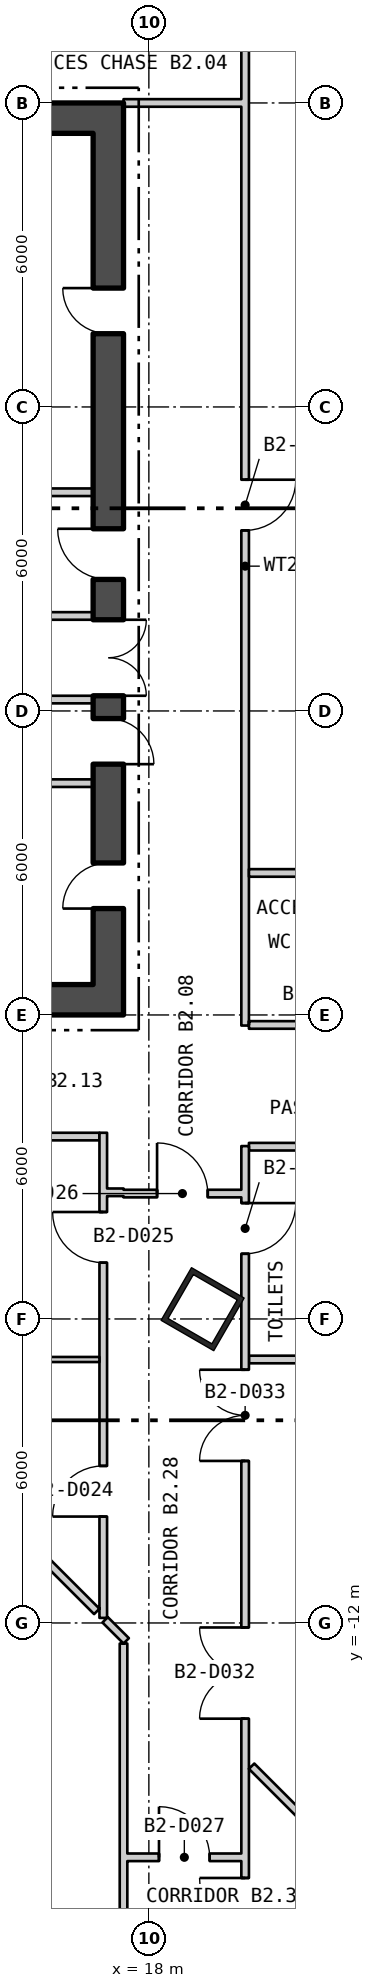
"""IFC4 building model, lengths in metres.
Left out: names, types, materials, properties, quantities, classifications, styles, units other than length and angle.
Written with IfcOpenShell. Run it as: python <this file> out.ifc"""

import sys

from ifc_helpers import new_model, si_unit, direction, frame, frame_2d, origin, origin_2d, place, context, subcontext, project, spatial, rectangle, hollow_rectangle, extrude, element, fill, save


model = new_model("IFC4")
c1 = context("Model", 3, precision=1e-05, world=origin(), true_north=direction((0.0, 1.0)))
c2 = subcontext(c1, "Body", "Model", "MODEL_VIEW")
j1 = project(units=[si_unit("LENGTHUNIT", "METRE"), si_unit("PLANEANGLEUNIT", "RADIAN")], contexts=[c1])
p1 = place(None, origin())
s1 = spatial("IfcSite", under=j1, at=p1, CompositionType="ELEMENT")
p2 = place(p1, origin())
s2 = spatial("IfcBuilding", under=s1, at=p2, CompositionType="ELEMENT")
p3 = place(p2, frame((0.0, 0.0, -11.4)))
s3 = spatial("IfcBuildingStorey", under=s2, at=p3, CompositionType="ELEMENT", Elevation=-11.4)
p4 = place(p3, frame((19.061, -5.807, 0.0), z_axis=(0.0, 0.0, 1.0), x_axis=(0.5, 0.866025403784, 0.0)))
e1 = element("IfcColumn", 1, at=p4, inside=s3, PredefinedType="COLUMN", context=c2, shape_type="SweptSolid", body=[
    extrude(hollow_rectangle(XDim=1.2, YDim=1.2, WallThickness=0.1, at=origin_2d()), origin(), (0.0, 0.0, 1.0), 5.7),
])
p5 = place(p3, frame((-17.5, 0.3, 0.0), z_axis=(0.0, 0.0, 1.0), x_axis=(1.0, 0.0, 0.0)))
e2 = element("IfcWall", 2, at=p5, inside=s3, PredefinedType="SHEAR", context=c2, shape_type="SweptSolid", body=[
    extrude(rectangle(XDim=35.0, YDim=0.6, at=frame_2d((17.5, 0.0))), origin(), (0.0, 0.0, 1.0), 5.25),
])
p6 = place(p5, frame((12.0, 0.0, 0.0)))
e3 = element("IfcOpeningElement", 3, at=p6, cuts=e2, PredefinedType="OPENING", context=c2, shape_type="SweptSolid", body=[
    extrude(rectangle(XDim=1.8, YDim=2.4, at=frame_2d((0.9, 1.2))), frame((0.0, 0.31, 0.0), z_axis=(0.0, -1.0, 0.0), x_axis=(1.0, 0.0, 0.0)), (0.0, 0.0, 1.0), 0.62),
])
p7 = place(p5, frame((22.0, 0.0, 0.0)))
e4 = element("IfcOpeningElement", 4, at=p7, cuts=e2, PredefinedType="OPENING", context=c2, shape_type="SweptSolid", body=[
    extrude(rectangle(XDim=1.8, YDim=2.4, at=frame_2d((0.9, 1.2))), frame((0.0, 0.31, 0.0), z_axis=(0.0, -1.0, 0.0), x_axis=(1.0, 0.0, 0.0)), (0.0, 0.0, 1.0), 0.62),
])
p8 = place(p3, frame((-17.5, 17.7, 0.0), z_axis=(0.0, 0.0, 1.0), x_axis=(1.0, 0.0, 0.0)))
e5 = element("IfcWall", 5, at=p8, inside=s3, PredefinedType="SHEAR", context=c2, shape_type="SweptSolid", body=[
    extrude(rectangle(XDim=35.0, YDim=0.6, at=frame_2d((17.5, 0.0))), origin(), (0.0, 0.0, 1.0), 5.25),
])
p9 = place(p3, frame((17.2, 0.6, 0.0), z_axis=(0.0, 0.0, 1.0), x_axis=(0.0, 1.0, 0.0)))
e6 = element("IfcWall", 6, at=p9, inside=s3, PredefinedType="SHEAR", context=c2, shape_type="SweptSolid", body=[
    extrude(rectangle(XDim=16.8, YDim=0.6, at=frame_2d((8.4, 0.0))), origin(), (0.0, 0.0, 1.0), 5.25),
])
p10 = place(p9, frame((5.7, 0.0, 0.0)))
e7 = element("IfcOpeningElement", 7, at=p10, cuts=e6, PredefinedType="OPENING", context=c2, shape_type="SweptSolid", body=[
    extrude(rectangle(XDim=1.5, YDim=2.1, at=frame_2d((0.75, 1.05))), frame((0.0, 0.31, 0.0), z_axis=(0.0, -1.0, 0.0), x_axis=(1.0, 0.0, 0.0)), (0.0, 0.0, 1.0), 0.62),
])
p11 = place(p9, frame((1.5, 0.0, 0.0)))
e8 = element("IfcOpeningElement", 8, at=p11, cuts=e6, PredefinedType="OPENING", context=c2, shape_type="SweptSolid", body=[
    extrude(rectangle(XDim=0.9, YDim=2.1, at=frame_2d((0.45, 1.05))), frame((0.0, 0.31, 0.0), z_axis=(0.0, -1.0, 0.0), x_axis=(1.0, 0.0, 0.0)), (0.0, 0.0, 1.0), 0.62),
])
p12 = place(p9, frame((4.35, 0.0, 0.0)))
e9 = element("IfcOpeningElement", 9, at=p12, cuts=e6, PredefinedType="OPENING", context=c2, shape_type="SweptSolid", body=[
    extrude(rectangle(XDim=0.9, YDim=2.1, at=frame_2d((0.45, 1.05))), frame((0.0, 0.31, 0.0), z_axis=(0.0, -1.0, 0.0), x_axis=(1.0, 0.0, 0.0)), (0.0, 0.0, 1.0), 0.62),
])
p13 = place(p9, frame((7.996, 0.0, 0.0)))
e10 = element("IfcOpeningElement", 10, at=p13, cuts=e6, PredefinedType="OPENING", context=c2, shape_type="SweptSolid", body=[
    extrude(rectangle(XDim=1.0, YDim=2.1, at=frame_2d((0.5, 1.05))), frame((0.0, 0.31, 0.0), z_axis=(0.0, -1.0, 0.0), x_axis=(1.0, 0.0, 0.0)), (0.0, 0.0, 1.0), 0.62),
])
p14 = place(p9, frame((12.846, 0.0, 0.0)))
e11 = element("IfcOpeningElement", 11, at=p14, cuts=e6, PredefinedType="OPENING", context=c2, shape_type="SweptSolid", body=[
    extrude(rectangle(XDim=0.9, YDim=2.1, at=frame_2d((0.45, 1.05))), frame((0.0, 0.31, 0.0), z_axis=(0.0, -1.0, 0.0), x_axis=(1.0, 0.0, 0.0)), (0.0, 0.0, 1.0), 0.62),
])
for number, where, z_axis, x_axis in (
    (12, (14.5, 6.225, 0.0), (0.0, 0.0, 1.0), (1.0, 0.0, 0.0)),
    (13, (14.5, 7.875, 0.0), (0.0, 0.0, 1.0), (1.0, 0.0, 0.0)),
    (14, (14.5, 4.575, 0.0), (0.0, 0.0, 1.0), (1.0, 0.0, 0.0)),
    (15, (14.5, 10.317, 0.0), (0.0, 0.0, 1.0), (1.0, 0.0, 0.0)),
):
    element("IfcWall", number, at=place(p3, frame(where, z_axis=z_axis, x_axis=x_axis)), inside=s3, PredefinedType="PARTITIONING", context=c2, shape_type="SweptSolid", body=[
        extrude(rectangle(XDim=2.4, YDim=0.15, at=frame_2d((1.2, 0.0))), origin(), (0.0, 0.0, 1.0), 5.25),
    ])
p15 = place(p3, frame((11.575, -2.4, 0.0), z_axis=(0.0, 0.0, 1.0), x_axis=(1.0, 0.0, 0.0)))
e16 = element("IfcWall", 16, at=p15, inside=s3, PredefinedType="PARTITIONING", context=c2, shape_type="SweptSolid", body=[
    extrude(rectangle(XDim=5.45, YDim=0.15, at=frame_2d((2.725, 0.0))), origin(), (0.0, 0.0, 1.0), 5.25),
])
p16 = place(p3, frame((11.947, -6.747, 0.0), z_axis=(0.0, 0.0, 1.0), x_axis=(0.707106781187, -0.707106781187, 0.0)))
e17 = element("IfcWall", 17, at=p16, inside=s3, PredefinedType="PARTITIONING", context=c2, shape_type="SweptSolid", body=[
    extrude(rectangle(XDim=7.106, YDim=0.15, at=frame_2d((3.553, 0.0))), origin(), (0.0, 0.0, 1.0), 5.25),
])
p17 = place(p3, frame((12.157, -6.8, 0.0), z_axis=(0.0, 0.0, 1.0), x_axis=(1.0, 0.0, 0.0)))
e18 = element("IfcWall", 18, at=p17, inside=s3, PredefinedType="PARTITIONING", context=c2, shape_type="SweptSolid", body=[
    extrude(rectangle(XDim=4.868, YDim=0.1, at=frame_2d((2.434, 0.0))), origin(), (0.0, 0.0, 1.0), 5.25),
])
p18 = place(p3, frame((17.1, -11.9, 0.0), z_axis=(0.0, 0.0, 1.0), x_axis=(0.0, 1.0, 0.0)))
e19 = element("IfcWall", 19, at=p18, inside=s3, PredefinedType="PARTITIONING", context=c2, shape_type="SweptSolid", body=[
    extrude(rectangle(XDim=9.575, YDim=0.15, at=frame_2d((4.787, 0.0))), origin(), (0.0, 0.0, 1.0), 5.25),
])
p19 = place(p18, frame((2.0, 0.0, 0.0)))
e20 = element("IfcOpeningElement", 20, at=p19, cuts=e19, PredefinedType="OPENING", context=c2, shape_type="SweptSolid", body=[
    extrude(rectangle(XDim=1.0, YDim=2.1, at=frame_2d((0.5, 1.05))), frame((0.0, 0.085, 0.0), z_axis=(0.0, -1.0, 0.0), x_axis=(1.0, 0.0, 0.0)), (0.0, 0.0, 1.0), 0.17),
])
p20 = place(p18, frame((7.011, 0.0, 0.0)))
e21 = element("IfcOpeningElement", 21, at=p20, cuts=e19, PredefinedType="OPENING", context=c2, shape_type="SweptSolid", body=[
    extrude(rectangle(XDim=1.0, YDim=2.1, at=frame_2d((0.5, 1.05))), frame((0.0, 0.085, 0.0), z_axis=(0.0, -1.0, 0.0), x_axis=(1.0, 0.0, 0.0)), (0.0, 0.0, 1.0), 0.17),
])
p21 = place(p3, frame((17.137, -11.938, 0.0), z_axis=(0.0, 0.0, 1.0), x_axis=(0.707957179278, -0.706255359136, 0.0)))
e22 = element("IfcWall", 22, at=p21, inside=s3, PredefinedType="PARTITIONING", context=c2, shape_type="SweptSolid", body=[
    extrude(rectangle(XDim=0.588, YDim=0.15, at=frame_2d((0.294, 0.0))), origin(), (0.0, 0.0, 1.0), 5.25),
])
p22 = place(p3, frame((17.175, -3.5, 0.0), z_axis=(0.0, 0.0, 1.0), x_axis=(1.0, 0.0, 0.0)))
e23 = element("IfcWall", 23, at=p22, inside=s3, PredefinedType="PARTITIONING", context=c2, shape_type="SweptSolid", body=[
    extrude(rectangle(XDim=0.325, YDim=0.15, at=frame_2d((0.163, 0.0))), origin(), (0.0, 0.0, 1.0), 5.25),
])
p23 = place(p3, frame((17.5, -19.963, 0.0), z_axis=(0.0, 0.0, 1.0), x_axis=(0.0, 1.0, 0.0)))
e24 = element("IfcWall", 24, at=p23, inside=s3, PredefinedType="PARTITIONING", context=c2, shape_type="SweptSolid", body=[
    extrude(rectangle(XDim=7.557, YDim=0.15, at=frame_2d((3.779, 0.0))), origin(), (0.0, 0.0, 1.0), 5.25),
])
p24 = place(p3, frame((17.5, -3.525, 0.0), z_axis=(0.0, 0.0, 1.0), x_axis=(1.0, 0.0, 0.0)))
e25 = element("IfcWall", 25, at=p24, inside=s3, PredefinedType="PARTITIONING", context=c2, shape_type="SweptSolid", body=[
    extrude(rectangle(XDim=2.325, YDim=0.15, at=frame_2d((1.163, 0.0))), origin(), (0.0, 0.0, 1.0), 5.25),
])
p25 = place(p24, frame((0.662, 0.0, 0.0)))
e26 = element("IfcOpeningElement", 26, at=p25, cuts=e25, PredefinedType="OPENING", context=c2, shape_type="SweptSolid", body=[
    extrude(rectangle(XDim=1.0, YDim=2.1, at=frame_2d((0.5, 1.05))), frame((0.0, 0.085, 0.0), z_axis=(0.0, -1.0, 0.0), x_axis=(1.0, 0.0, 0.0)), (0.0, 0.0, 1.0), 0.17),
])
p26 = place(p3, frame((17.5, 18.0, 0.0), z_axis=(0.0, 0.0, 1.0), x_axis=(1.0, 0.0, 0.0)))
e27 = element("IfcWall", 27, at=p26, inside=s3, PredefinedType="PARTITIONING", context=c2, shape_type="SweptSolid", body=[
    extrude(rectangle(XDim=2.475, YDim=0.15, at=frame_2d((1.238, 0.0))), origin(), (0.0, 0.0, 1.0), 5.25),
])
p27 = place(p3, frame((17.575, -16.625, 0.0), z_axis=(0.0, 0.0, 1.0), x_axis=(1.0, 0.0, 0.0)))
e28 = element("IfcWall", 28, at=p27, inside=s3, PredefinedType="PARTITIONING", context=c2, shape_type="SweptSolid", body=[
    extrude(rectangle(XDim=2.25, YDim=0.15, at=frame_2d((1.125, 0.0))), origin(), (0.0, 0.0, 1.0), 5.25),
])
p28 = place(p27, frame((0.625, 0.0, 0.0)))
e29 = element("IfcOpeningElement", 29, at=p28, cuts=e28, PredefinedType="OPENING", context=c2, shape_type="SweptSolid", body=[
    extrude(rectangle(XDim=1.0, YDim=2.1, at=frame_2d((0.5, 1.05))), frame((0.0, 0.085, 0.0), z_axis=(0.0, -1.0, 0.0), x_axis=(1.0, 0.0, 0.0)), (0.0, 0.0, 1.0), 0.17),
])
p29 = place(p3, frame((19.9, -23.775, 0.0), z_axis=(0.0, 0.0, 1.0), x_axis=(0.0, 1.0, 0.0)))
e30 = element("IfcWall", 30, at=p29, inside=s3, PredefinedType="PARTITIONING", context=c2, shape_type="SweptSolid", body=[
    extrude(rectangle(XDim=21.187, YDim=0.15, at=frame_2d((10.594, 0.0))), origin(), (0.0, 0.0, 1.0), 5.25),
])
p30 = place(p29, frame((0.275, 0.0, 0.0)))
e31 = element("IfcOpeningElement", 31, at=p30, cuts=e30, PredefinedType="OPENING", context=c2, shape_type="SweptSolid", body=[
    extrude(rectangle(XDim=1.0, YDim=2.1, at=frame_2d((0.5, 1.05))), frame((0.0, 0.085, 0.0), z_axis=(0.0, -1.0, 0.0), x_axis=(1.0, 0.0, 0.0)), (0.0, 0.0, 1.0), 0.17),
])
p31 = place(p29, frame((4.942, 0.0, 0.0)))
e32 = element("IfcOpeningElement", 32, at=p31, cuts=e30, PredefinedType="OPENING", context=c2, shape_type="SweptSolid", body=[
    extrude(rectangle(XDim=1.8, YDim=2.1, at=frame_2d((0.9, 1.05))), frame((0.0, 0.085, 0.0), z_axis=(0.0, -1.0, 0.0), x_axis=(1.0, 0.0, 0.0)), (0.0, 0.0, 1.0), 0.17),
])
p32 = place(p29, frame((9.886, 0.0, 0.0)))
e33 = element("IfcOpeningElement", 33, at=p32, cuts=e30, PredefinedType="OPENING", context=c2, shape_type="SweptSolid", body=[
    extrude(rectangle(XDim=1.8, YDim=2.1, at=frame_2d((0.9, 1.05))), frame((0.0, 0.085, 0.0), z_axis=(0.0, -1.0, 0.0), x_axis=(1.0, 0.0, 0.0)), (0.0, 0.0, 1.0), 0.17),
])
p33 = place(p29, frame((14.973, 0.0, 0.0)))
e34 = element("IfcOpeningElement", 34, at=p33, cuts=e30, PredefinedType="OPENING", context=c2, shape_type="SweptSolid", body=[
    extrude(rectangle(XDim=1.8, YDim=2.1, at=frame_2d((0.9, 1.05))), frame((0.0, 0.085, 0.0), z_axis=(0.0, -1.0, 0.0), x_axis=(1.0, 0.0, 0.0)), (0.0, 0.0, 1.0), 0.17),
])
p34 = place(p29, frame((19.062, 0.0, 0.0)))
e35 = element("IfcOpeningElement", 35, at=p34, cuts=e30, PredefinedType="OPENING", context=c2, shape_type="SweptSolid", body=[
    extrude(rectangle(XDim=1.0, YDim=2.1, at=frame_2d((0.5, 1.05))), frame((0.0, 0.085, 0.0), z_axis=(0.0, -1.0, 0.0), x_axis=(1.0, 0.0, 0.0)), (0.0, 0.0, 1.0), 0.17),
])
p35 = place(p3, frame((19.9, -0.209, 0.0), z_axis=(0.0, 0.0, 1.0), x_axis=(0.0, 1.0, 0.0)))
e36 = element("IfcWall", 36, at=p35, inside=s3, PredefinedType="PARTITIONING", context=c2, shape_type="SweptSolid", body=[
    extrude(rectangle(XDim=18.134, YDim=0.15, at=frame_2d((9.067, 0.0))), origin(), (0.0, 0.0, 1.0), 5.25),
])
p36 = place(p35, frame((9.773, 0.0, 0.0)))
e37 = element("IfcOpeningElement", 37, at=p36, cuts=e36, PredefinedType="OPENING", context=c2, shape_type="SweptSolid", body=[
    extrude(rectangle(XDim=1.0, YDim=2.1, at=frame_2d((0.5, 1.05))), frame((0.0, 0.085, 0.0), z_axis=(0.0, -1.0, 0.0), x_axis=(1.0, 0.0, 0.0)), (0.0, 0.0, 1.0), 0.17),
])
p37 = place(p3, frame((19.9, 18.075, 0.0), z_axis=(0.0, 0.0, 1.0), x_axis=(0.0, 1.0, 0.0)))
e38 = element("IfcWall", 38, at=p37, inside=s3, PredefinedType="PARTITIONING", context=c2, shape_type="SweptSolid", body=[
    extrude(rectangle(XDim=1.675, YDim=0.15, at=frame_2d((0.838, 0.0))), origin(), (0.0, 0.0, 1.0), 5.25),
])
p38 = place(p3, frame((19.975, -6.8, 0.0), z_axis=(0.0, 0.0, 1.0), x_axis=(1.0, 0.0, 0.0)))
e39 = element("IfcWall", 39, at=p38, inside=s3, PredefinedType="PARTITIONING", context=c2, shape_type="SweptSolid", body=[
    extrude(rectangle(XDim=6.775, YDim=0.15, at=frame_2d((3.388, 0.0))), origin(), (0.0, 0.0, 1.0), 5.25),
])
p39 = place(p3, frame((19.975, -2.6, 0.0), z_axis=(0.0, 0.0, 1.0), x_axis=(1.0, 0.0, 0.0)))
e40 = element("IfcWall", 40, at=p39, inside=s3, PredefinedType="PARTITIONING", context=c2, shape_type="SweptSolid", body=[
    extrude(rectangle(XDim=2.282, YDim=0.15, at=frame_2d((1.141, 0.0))), origin(), (0.0, 0.0, 1.0), 5.25),
])
p40 = place(p3, frame((19.975, 2.803, 0.0), z_axis=(0.0, 0.0, 1.0), x_axis=(1.0, 0.0, 0.0)))
e41 = element("IfcWall", 41, at=p40, inside=s3, PredefinedType="PARTITIONING", context=c2, shape_type="SweptSolid", body=[
    extrude(rectangle(XDim=2.925, YDim=0.15, at=frame_2d((1.462, 0.0))), origin(), (0.0, 0.0, 1.0), 5.25),
])
p41 = place(p3, frame((19.975, -0.197, 0.0), z_axis=(0.0, 0.0, 1.0), x_axis=(0.999999901962, -0.000442804385, 0.0)))
e42 = element("IfcWall", 42, at=p41, inside=s3, PredefinedType="PARTITIONING", context=c2, shape_type="SweptSolid", body=[
    extrude(rectangle(XDim=6.775, YDim=0.15, at=frame_2d((3.388, 0.0))), origin(), (0.0, 0.0, 1.0), 5.25),
])
p42 = place(p41, frame((0.962, 0.0, 0.0)))
e43 = element("IfcOpeningElement", 43, at=p42, cuts=e42, PredefinedType="OPENING", context=c2, shape_type="SweptSolid", body=[
    extrude(rectangle(XDim=1.0, YDim=2.1, at=frame_2d((0.5, 1.05))), frame((0.0, 0.085, 0.0), z_axis=(0.0, -1.0, 0.0), x_axis=(1.0, 0.0, 0.0)), (0.0, 0.0, 1.0), 0.17),
])
p43 = place(p3, frame((20.028, -14.827, 0.0), z_axis=(0.0, 0.0, 1.0), x_axis=(0.707106781187, -0.707106781187, 0.0)))
e44 = element("IfcWall", 44, at=p43, inside=s3, PredefinedType="PARTITIONING", context=c2, shape_type="SweptSolid", body=[
    extrude(rectangle(XDim=7.068, YDim=0.15, at=frame_2d((3.534, 0.0))), origin(), (0.0, 0.0, 1.0), 5.25),
])
p44 = place(p10, origin())
e45 = element("IfcDoor", 45, at=p44, inside=s3, OperationType="DOUBLE_DOOR_SINGLE_SWING", PredefinedType="DOOR", context=c2, shape_type="SweptSolid", body=[
    extrude(rectangle(XDim=1.5, YDim=2.1, at=frame_2d((0.75, 1.05))), frame((0.0, 0.025, 0.0), z_axis=(0.0, -1.0, 0.0), x_axis=(1.0, 0.0, 0.0)), (0.0, 0.0, 1.0), 0.05),
])
fill(e7, e45)
p45 = place(p11, origin())
e46 = element("IfcDoor", 46, at=p45, inside=s3, OperationType="SINGLE_SWING_RIGHT", PredefinedType="DOOR", context=c2, shape_type="SweptSolid", body=[
    extrude(rectangle(XDim=0.9, YDim=2.1, at=frame_2d((0.45, 1.05))), frame((0.0, 0.025, 0.0), z_axis=(0.0, -1.0, 0.0), x_axis=(1.0, 0.0, 0.0)), (0.0, 0.0, 1.0), 0.05),
])
fill(e8, e46)
p46 = place(p12, origin())
e47 = element("IfcDoor", 47, at=p46, inside=s3, OperationType="SINGLE_SWING_LEFT", PredefinedType="DOOR", context=c2, shape_type="SweptSolid", body=[
    extrude(rectangle(XDim=0.9, YDim=2.1, at=frame_2d((0.45, 1.05))), frame((0.0, 0.025, 0.0), z_axis=(0.0, -1.0, 0.0), x_axis=(1.0, 0.0, 0.0)), (0.0, 0.0, 1.0), 0.05),
])
fill(e9, e47)
p47 = place(p13, origin())
e48 = element("IfcDoor", 48, at=p47, inside=s3, OperationType="SINGLE_SWING_LEFT", PredefinedType="DOOR", context=c2, shape_type="SweptSolid", body=[
    extrude(rectangle(XDim=1.0, YDim=2.1, at=frame_2d((0.5, 1.05))), frame((0.0, 0.025, 0.0), z_axis=(0.0, -1.0, 0.0), x_axis=(1.0, 0.0, 0.0)), (0.0, 0.0, 1.0), 0.05),
])
fill(e10, e48)
p48 = place(p14, origin())
e49 = element("IfcDoor", 49, at=p48, inside=s3, OperationType="SINGLE_SWING_LEFT", PredefinedType="DOOR", context=c2, shape_type="SweptSolid", body=[
    extrude(rectangle(XDim=0.9, YDim=2.1, at=frame_2d((0.45, 1.05))), frame((0.0, 0.025, 0.0), z_axis=(0.0, -1.0, 0.0), x_axis=(1.0, 0.0, 0.0)), (0.0, 0.0, 1.0), 0.05),
])
fill(e11, e49)
p49 = place(p19, origin())
e50 = element("IfcDoor", 50, at=p49, inside=s3, OperationType="SINGLE_SWING_RIGHT", PredefinedType="DOOR", context=c2, shape_type="SweptSolid", body=[
    extrude(rectangle(XDim=1.0, YDim=2.1, at=frame_2d((0.5, 1.05))), frame((0.0, 0.025, 0.0), z_axis=(0.0, -1.0, 0.0), x_axis=(1.0, 0.0, 0.0)), (0.0, 0.0, 1.0), 0.05),
])
fill(e20, e50)
p50 = place(p20, origin())
e51 = element("IfcDoor", 51, at=p50, inside=s3, OperationType="SINGLE_SWING_LEFT", PredefinedType="DOOR", context=c2, shape_type="SweptSolid", body=[
    extrude(rectangle(XDim=1.0, YDim=2.1, at=frame_2d((0.5, 1.05))), frame((0.0, 0.025, 0.0), z_axis=(0.0, -1.0, 0.0), x_axis=(1.0, 0.0, 0.0)), (0.0, 0.0, 1.0), 0.05),
])
fill(e21, e51)
p51 = place(p25, origin())
e52 = element("IfcDoor", 52, at=p51, inside=s3, OperationType="SINGLE_SWING_RIGHT", PredefinedType="DOOR", context=c2, shape_type="SweptSolid", body=[
    extrude(rectangle(XDim=1.0, YDim=2.1, at=frame_2d((0.5, 1.05))), frame((0.0, 0.025, 0.0), z_axis=(0.0, -1.0, 0.0), x_axis=(1.0, 0.0, 0.0)), (0.0, 0.0, 1.0), 0.05),
])
fill(e26, e52)
p52 = place(p28, origin())
e53 = element("IfcDoor", 53, at=p52, inside=s3, OperationType="SINGLE_SWING_RIGHT", PredefinedType="DOOR", context=c2, shape_type="SweptSolid", body=[
    extrude(rectangle(XDim=1.0, YDim=2.1, at=frame_2d((0.5, 1.05))), frame((0.0, 0.025, 0.0), z_axis=(0.0, -1.0, 0.0), x_axis=(1.0, 0.0, 0.0)), (0.0, 0.0, 1.0), 0.05),
])
fill(e29, e53)
p53 = place(p31, origin())
e54 = element("IfcDoor", 54, at=p53, inside=s3, OperationType="DOUBLE_DOOR_SINGLE_SWING", PredefinedType="DOOR", context=c2, shape_type="SweptSolid", body=[
    extrude(rectangle(XDim=1.8, YDim=2.1, at=frame_2d((0.9, 1.05))), frame((0.0, 0.025, 0.0), z_axis=(0.0, -1.0, 0.0), x_axis=(1.0, 0.0, 0.0)), (0.0, 0.0, 1.0), 0.05),
])
fill(e32, e54)
p54 = place(p32, origin())
e55 = element("IfcDoor", 55, at=p54, inside=s3, OperationType="DOUBLE_DOOR_SINGLE_SWING", PredefinedType="DOOR", context=c2, shape_type="SweptSolid", body=[
    extrude(rectangle(XDim=1.8, YDim=2.1, at=frame_2d((0.9, 1.05))), frame((0.0, 0.025, 0.0), z_axis=(0.0, -1.0, 0.0), x_axis=(1.0, 0.0, 0.0)), (0.0, 0.0, 1.0), 0.05),
])
fill(e33, e55)
p55 = place(p33, origin())
e56 = element("IfcDoor", 56, at=p55, inside=s3, OperationType="DOUBLE_DOOR_SINGLE_SWING", PredefinedType="DOOR", context=c2, shape_type="SweptSolid", body=[
    extrude(rectangle(XDim=1.8, YDim=2.1, at=frame_2d((0.9, 1.05))), frame((0.0, 0.025, 0.0), z_axis=(0.0, -1.0, 0.0), x_axis=(1.0, 0.0, 0.0)), (0.0, 0.0, 1.0), 0.05),
])
fill(e34, e56)
p56 = place(p34, origin())
e57 = element("IfcDoor", 57, at=p56, inside=s3, OperationType="SINGLE_SWING_RIGHT", PredefinedType="DOOR", context=c2, shape_type="SweptSolid", body=[
    extrude(rectangle(XDim=1.0, YDim=2.1, at=frame_2d((0.5, 1.05))), frame((0.0, 0.025, 0.0), z_axis=(0.0, -1.0, 0.0), x_axis=(1.0, 0.0, 0.0)), (0.0, 0.0, 1.0), 0.05),
])
fill(e35, e57)
p57 = place(p36, origin())
e58 = element("IfcDoor", 58, at=p57, inside=s3, OperationType="SINGLE_SWING_RIGHT", PredefinedType="DOOR", context=c2, shape_type="SweptSolid", body=[
    extrude(rectangle(XDim=1.0, YDim=2.1, at=frame_2d((0.5, 1.05))), frame((0.0, 0.025, 0.0), z_axis=(0.0, -1.0, 0.0), x_axis=(1.0, 0.0, 0.0)), (0.0, 0.0, 1.0), 0.05),
])
fill(e37, e58)
save(model, sys.argv[1])
